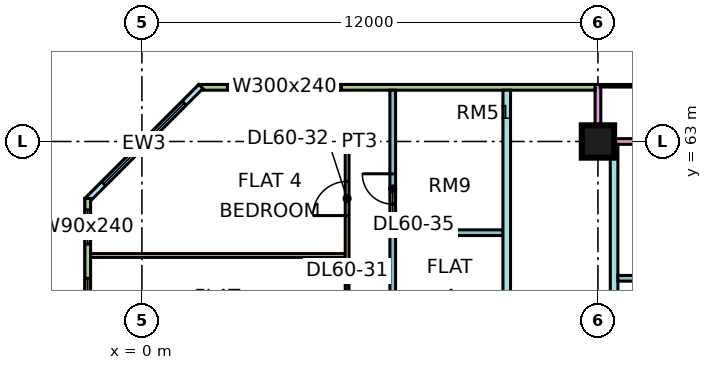
"""IFC4 building model, lengths in metres.
Left out: names, types, materials, properties, quantities, classifications, styles, units other than length and angle.
Written with IfcOpenShell. Run it as: python <this file> out.ifc"""

import sys

from ifc_helpers import new_model, si_unit, direction, frame, frame_2d, origin, origin_2d, place, context, subcontext, project, spatial, rectangle, extrude, element, fill, save


model = new_model("IFC4")
c1 = context("Model", 3, precision=1e-05, world=origin(), true_north=direction((0.0, 1.0)))
c2 = subcontext(c1, "Body", "Model", "MODEL_VIEW")
j1 = project(units=[si_unit("LENGTHUNIT", "METRE"), si_unit("PLANEANGLEUNIT", "RADIAN")], contexts=[c1])
p1 = place(None, origin())
s1 = spatial("IfcSite", under=j1, at=p1, CompositionType="ELEMENT")
p2 = place(p1, origin())
s2 = spatial("IfcBuilding", under=s1, at=p2, CompositionType="ELEMENT")
p3 = place(p2, frame((0.0, 0.0, 252.9)))
s3 = spatial("IfcBuildingStorey", under=s2, at=p3, CompositionType="ELEMENT", Elevation=252.9)
p4 = place(p3, frame((12.0, 63.0, 0.0), z_axis=(0.0, 0.0, 1.0), x_axis=(1.0, 0.0, 0.0)))
e1 = element("IfcColumn", 1, at=p4, inside=s3, PredefinedType="COLUMN", context=c2, shape_type="SweptSolid", body=[
    extrude(rectangle(XDim=0.85, YDim=0.85, at=origin_2d()), origin(), (0.0, 0.0, 1.0), 3.75),
])
p5 = place(p3, frame((22.425, 63.0, 0.0), z_axis=(0.0, 0.0, 1.0), x_axis=(-1.0, 0.0, 0.0)))
e2 = element("IfcWall", 2, at=p5, inside=s3, PredefinedType="SOLIDWALL", context=c2, shape_type="SweptSolid", body=[
    extrude(rectangle(XDim=10.35, YDim=0.15, at=frame_2d((5.175, 0.0))), origin(), (0.0, 0.0, 1.0), 3.3),
])
p6 = place(p5, frame((1.7, 0.0, 0.0)))
e3 = element("IfcOpeningElement", 3, at=p6, cuts=e2, PredefinedType="OPENING", context=c2, shape_type="SweptSolid", body=[
    extrude(rectangle(XDim=1.8, YDim=2.4, at=frame_2d((0.9, 1.2))), frame((0.0, 0.085, 0.0), z_axis=(0.0, -1.0, 0.0), x_axis=(1.0, 0.0, 0.0)), (0.0, 0.0, 1.0), 0.17),
])
p7 = place(p5, frame((6.05, 0.0, 0.45)))
e4 = element("IfcOpeningElement", 4, at=p7, cuts=e2, PredefinedType="OPENING", context=c2, shape_type="SweptSolid", body=[
    extrude(rectangle(XDim=3.0, YDim=2.4, at=frame_2d((1.5, 1.2))), frame((0.0, 0.085, 0.0), z_axis=(0.0, -1.0, 0.0), x_axis=(1.0, 0.0, 0.0)), (0.0, 0.0, 1.0), 0.17),
])
p8 = place(p3, frame((12.0, 64.5, 0.0), z_axis=(0.0, 0.0, 1.0), x_axis=(0.0, -1.0, 0.0)))
e5 = element("IfcWall", 5, at=p8, inside=s3, PredefinedType="SOLIDWALL", context=c2, shape_type="SweptSolid", body=[
    extrude(rectangle(XDim=1.5, YDim=0.15, at=frame_2d((0.75, 0.0))), origin(), (0.0, 0.0, 1.0), 3.3),
])
p9 = place(p3, frame((11.925, 64.425, 0.0), z_axis=(0.0, 0.0, 1.0), x_axis=(-1.0, 0.0, 0.0)))
e6 = element("IfcWall", 6, at=p9, inside=s3, PredefinedType="SOLIDWALL", context=c2, shape_type="SweptSolid", body=[
    extrude(rectangle(XDim=10.425, YDim=0.15, at=frame_2d((5.212, 0.0))), origin(), (0.0, 0.0, 1.0), 3.3),
])
p10 = place(p9, frame((6.675, 0.0, 0.45)))
e7 = element("IfcOpeningElement", 7, at=p10, cuts=e6, PredefinedType="OPENING", context=c2, shape_type="SweptSolid", body=[
    extrude(rectangle(XDim=3.0, YDim=2.4, at=frame_2d((1.5, 1.2))), frame((0.0, 0.085, 0.0), z_axis=(0.0, -1.0, 0.0), x_axis=(1.0, 0.0, 0.0)), (0.0, 0.0, 1.0), 0.17),
])
p11 = place(p3, frame((1.553, 64.447, 0.0), z_axis=(0.0, 0.0, 1.0), x_axis=(-0.707106781187, -0.707106781187, 0.0)))
e8 = element("IfcWall", 8, at=p11, inside=s3, PredefinedType="SOLIDWALL", context=c2, shape_type="SweptSolid", body=[
    extrude(rectangle(XDim=4.243, YDim=0.15, at=frame_2d((2.121, 0.0))), origin(), (0.0, 0.0, 1.0), 3.3),
])
p12 = place(p11, frame((0.621, 0.0, 0.45)))
e9 = element("IfcOpeningElement", 9, at=p12, cuts=e8, PredefinedType="OPENING", context=c2, shape_type="SweptSolid", body=[
    extrude(rectangle(XDim=3.0, YDim=2.4, at=frame_2d((1.5, 1.2))), frame((0.0, 0.085, 0.0), z_axis=(0.0, -1.0, 0.0), x_axis=(1.0, 0.0, 0.0)), (0.0, 0.0, 1.0), 0.17),
])
p13 = place(p3, frame((-1.425, 61.5, 0.0), z_axis=(0.0, 0.0, 1.0), x_axis=(0.0, -1.0, 0.0)))
e10 = element("IfcWall", 10, at=p13, inside=s3, PredefinedType="SOLIDWALL", context=c2, shape_type="SweptSolid", body=[
    extrude(rectangle(XDim=13.425, YDim=0.15, at=frame_2d((6.712, 0.0))), origin(), (0.0, 0.0, 1.0), 3.3),
])
p14 = place(p13, frame((0.3, 0.0, 0.45)))
e11 = element("IfcOpeningElement", 11, at=p14, cuts=e10, PredefinedType="OPENING", context=c2, shape_type="SweptSolid", body=[
    extrude(rectangle(XDim=0.9, YDim=2.4, at=frame_2d((0.45, 1.2))), frame((0.0, 0.085, 0.0), z_axis=(0.0, -1.0, 0.0), x_axis=(1.0, 0.0, 0.0)), (0.0, 0.0, 1.0), 0.17),
])
p15 = place(p13, frame((2.1, 0.0, 0.45)))
e12 = element("IfcOpeningElement", 12, at=p15, cuts=e10, PredefinedType="OPENING", context=c2, shape_type="SweptSolid", body=[
    extrude(rectangle(XDim=1.8, YDim=2.4, at=frame_2d((0.9, 1.2))), frame((0.0, 0.085, 0.0), z_axis=(0.0, -1.0, 0.0), x_axis=(1.0, 0.0, 0.0)), (0.0, 0.0, 1.0), 0.17),
])
p16 = place(p13, frame((7.462, 0.0, 0.45)))
e13 = element("IfcOpeningElement", 13, at=p16, cuts=e10, PredefinedType="OPENING", context=c2, shape_type="SweptSolid", body=[
    extrude(rectangle(XDim=3.0, YDim=2.4, at=frame_2d((1.5, 1.2))), frame((0.0, 0.085, 0.0), z_axis=(0.0, -1.0, 0.0), x_axis=(1.0, 0.0, 0.0)), (0.0, 0.0, 1.0), 0.17),
])
p17 = place(p3, frame((-1.351, 60.0, 0.0), z_axis=(0.0, 0.0, 1.0), x_axis=(1.0, 0.0, 0.0)))
e14 = element("IfcWall", 14, at=p17, inside=s3, PredefinedType="PARTITIONING", context=c2, shape_type="SweptSolid", body=[
    extrude(rectangle(XDim=6.701, YDim=0.1, at=frame_2d((3.351, 0.0))), origin(), (0.0, 0.0, 1.0), 3.3),
])
p18 = place(p3, frame((5.4, 36.1, 0.0), z_axis=(0.0, 0.0, 1.0), x_axis=(0.0, 1.0, 0.0)))
e15 = element("IfcWall", 15, at=p18, inside=s3, PredefinedType="PARTITIONING", context=c2, shape_type="SweptSolid", body=[
    extrude(rectangle(XDim=26.95, YDim=0.1, at=frame_2d((13.475, 0.0))), origin(), (0.0, 0.0, 1.0), 3.3),
])
p19 = place(p18, frame((0.95, 0.0, 0.0)))
e16 = element("IfcOpeningElement", 16, at=p19, cuts=e15, PredefinedType="OPENING", context=c2, shape_type="SweptSolid", body=[
    extrude(rectangle(XDim=0.9, YDim=2.1, at=frame_2d((0.45, 1.05))), frame((0.0, 0.06, 0.0), z_axis=(0.0, -1.0, 0.0), x_axis=(1.0, 0.0, 0.0)), (0.0, 0.0, 1.0), 0.12),
])
p20 = place(p18, frame((3.95, 0.0, 0.0)))
e17 = element("IfcOpeningElement", 17, at=p20, cuts=e15, PredefinedType="OPENING", context=c2, shape_type="SweptSolid", body=[
    extrude(rectangle(XDim=0.9, YDim=2.1, at=frame_2d((0.45, 1.05))), frame((0.0, 0.06, 0.0), z_axis=(0.0, -1.0, 0.0), x_axis=(1.0, 0.0, 0.0)), (0.0, 0.0, 1.0), 0.12),
])
p21 = place(p18, frame((6.95, 0.0, 0.0)))
e18 = element("IfcOpeningElement", 18, at=p21, cuts=e15, PredefinedType="OPENING", context=c2, shape_type="SweptSolid", body=[
    extrude(rectangle(XDim=0.9, YDim=2.1, at=frame_2d((0.45, 1.05))), frame((0.0, 0.06, 0.0), z_axis=(0.0, -1.0, 0.0), x_axis=(1.0, 0.0, 0.0)), (0.0, 0.0, 1.0), 0.12),
])
p22 = place(p18, frame((9.95, 0.0, 0.0)))
e19 = element("IfcOpeningElement", 19, at=p22, cuts=e15, PredefinedType="OPENING", context=c2, shape_type="SweptSolid", body=[
    extrude(rectangle(XDim=0.9, YDim=2.1, at=frame_2d((0.45, 1.05))), frame((0.0, 0.06, 0.0), z_axis=(0.0, -1.0, 0.0), x_axis=(1.0, 0.0, 0.0)), (0.0, 0.0, 1.0), 0.12),
])
p23 = place(p18, frame((21.95, 0.0, 0.0)))
e20 = element("IfcOpeningElement", 20, at=p23, cuts=e15, PredefinedType="OPENING", context=c2, shape_type="SweptSolid", body=[
    extrude(rectangle(XDim=0.9, YDim=2.1, at=frame_2d((0.45, 1.05))), frame((0.0, 0.06, 0.0), z_axis=(0.0, -1.0, 0.0), x_axis=(1.0, 0.0, 0.0)), (0.0, 0.0, 1.0), 0.12),
])
p24 = place(p18, frame((24.95, 0.0, 0.0)))
e21 = element("IfcOpeningElement", 21, at=p24, cuts=e15, PredefinedType="OPENING", context=c2, shape_type="SweptSolid", body=[
    extrude(rectangle(XDim=0.9, YDim=2.1, at=frame_2d((0.45, 1.05))), frame((0.0, 0.06, 0.0), z_axis=(0.0, -1.0, 0.0), x_axis=(1.0, 0.0, 0.0)), (0.0, 0.0, 1.0), 0.12),
])
p25 = place(p18, frame((15.95, 0.0, 0.0)))
e22 = element("IfcOpeningElement", 22, at=p25, cuts=e15, PredefinedType="OPENING", context=c2, shape_type="SweptSolid", body=[
    extrude(rectangle(XDim=0.9, YDim=2.1, at=frame_2d((0.45, 1.05))), frame((0.0, 0.06, 0.0), z_axis=(0.0, -1.0, 0.0), x_axis=(1.0, 0.0, 0.0)), (0.0, 0.0, 1.0), 0.12),
])
p26 = place(p3, frame((5.45, 63.0, 0.0), z_axis=(0.0, 0.0, 1.0), x_axis=(1.0, 0.0, 0.0)))
e23 = element("IfcWall", 23, at=p26, inside=s3, PredefinedType="PARTITIONING", context=c2, shape_type="SweptSolid", body=[
    extrude(rectangle(XDim=0.55, YDim=0.1, at=frame_2d((0.275, 0.0))), origin(), (0.0, 0.0, 1.0), 3.3),
])
p27 = place(p3, frame((6.6, 50.35, 0.0), z_axis=(0.0, 0.0, 1.0), x_axis=(0.0, 1.0, 0.0)))
e24 = element("IfcWall", 24, at=p27, inside=s3, PredefinedType="PARTITIONING", context=c2, shape_type="SweptSolid", body=[
    extrude(rectangle(XDim=14.0, YDim=0.15, at=frame_2d((7.0, 0.0))), origin(), (0.0, 0.0, 1.0), 3.3),
])
p28 = place(p27, frame((11.0, 0.0, 0.0)))
e25 = element("IfcOpeningElement", 25, at=p28, cuts=e24, PredefinedType="OPENING", context=c2, shape_type="SweptSolid", body=[
    extrude(rectangle(XDim=0.8, YDim=2.1, at=frame_2d((0.4, 1.05))), frame((0.0, 0.085, 0.0), z_axis=(0.0, -1.0, 0.0), x_axis=(1.0, 0.0, 0.0)), (0.0, 0.0, 1.0), 0.17),
])
p29 = place(p27, frame((4.25, 0.0, 0.0)))
e26 = element("IfcOpeningElement", 26, at=p29, cuts=e24, PredefinedType="OPENING", context=c2, shape_type="SweptSolid", body=[
    extrude(rectangle(XDim=0.8, YDim=2.1, at=frame_2d((0.4, 1.05))), frame((0.0, 0.085, 0.0), z_axis=(0.0, -1.0, 0.0), x_axis=(1.0, 0.0, 0.0)), (0.0, 0.0, 1.0), 0.17),
])
p30 = place(p27, frame((7.7, 0.0, 0.0)))
e27 = element("IfcOpeningElement", 27, at=p30, cuts=e24, PredefinedType="OPENING", context=c2, shape_type="SweptSolid", body=[
    extrude(rectangle(XDim=0.8, YDim=2.1, at=frame_2d((0.4, 1.05))), frame((0.0, 0.085, 0.0), z_axis=(0.0, -1.0, 0.0), x_axis=(1.0, 0.0, 0.0)), (0.0, 0.0, 1.0), 0.17),
])
p31 = place(p3, frame((6.675, 60.6, 0.0), z_axis=(0.0, 0.0, 1.0), x_axis=(1.0, 0.0, 0.0)))
e28 = element("IfcWall", 28, at=p31, inside=s3, PredefinedType="PARTITIONING", context=c2, shape_type="SweptSolid", body=[
    extrude(rectangle(XDim=2.825, YDim=0.15, at=frame_2d((1.413, 0.0))), origin(), (0.0, 0.0, 1.0), 3.3),
])
p32 = place(p3, frame((9.6, 20.0, 0.0), z_axis=(0.0, 0.0, 1.0), x_axis=(0.0, 1.0, 0.0)))
e29 = element("IfcWall", 29, at=p32, inside=s3, PredefinedType="PARTITIONING", context=c2, shape_type="SweptSolid", body=[
    extrude(rectangle(XDim=44.35, YDim=0.2, at=frame_2d((22.175, 0.0))), origin(), (0.0, 0.0, 1.0), 3.3),
])
p33 = place(p32, frame((28.8, 0.0, 0.0)))
e30 = element("IfcOpeningElement", 30, at=p33, cuts=e29, PredefinedType="OPENING", context=c2, shape_type="SweptSolid", body=[
    extrude(rectangle(XDim=1.0, YDim=2.1, at=frame_2d((0.5, 1.05))), frame((0.0, 0.11, 0.0), z_axis=(0.0, -1.0, 0.0), x_axis=(1.0, 0.0, 0.0)), (0.0, 0.0, 1.0), 0.22),
])
p34 = place(p32, frame((0.6, 0.0, 0.0)))
e31 = element("IfcOpeningElement", 31, at=p34, cuts=e29, PredefinedType="OPENING", context=c2, shape_type="SweptSolid", body=[
    extrude(rectangle(XDim=1.2, YDim=2.1, at=frame_2d((0.6, 1.05))), frame((0.0, 0.11, 0.0), z_axis=(0.0, -1.0, 0.0), x_axis=(1.0, 0.0, 0.0)), (0.0, 0.0, 1.0), 0.22),
])
p35 = place(p32, frame((3.9, 0.0, 0.0)))
e32 = element("IfcOpeningElement", 32, at=p35, cuts=e29, PredefinedType="OPENING", context=c2, shape_type="SweptSolid", body=[
    extrude(rectangle(XDim=1.0, YDim=2.1, at=frame_2d((0.5, 1.05))), frame((0.0, 0.11, 0.0), z_axis=(0.0, -1.0, 0.0), x_axis=(1.0, 0.0, 0.0)), (0.0, 0.0, 1.0), 0.22),
])
p36 = place(p3, frame((12.425, 20.0, 0.0), z_axis=(0.0, 0.0, 1.0), x_axis=(0.0, 1.0, 0.0)))
e33 = element("IfcWall", 33, at=p36, inside=s3, PredefinedType="PARTITIONING", context=c2, shape_type="SweptSolid", body=[
    extrude(rectangle(XDim=42.926, YDim=0.2, at=frame_2d((21.463, 0.0))), origin(), (0.0, 0.0, 1.0), 3.3),
])
p37 = place(p36, frame((7.0, 0.0, 0.0)))
e34 = element("IfcOpeningElement", 34, at=p37, cuts=e33, PredefinedType="OPENING", context=c2, shape_type="SweptSolid", body=[
    extrude(rectangle(XDim=1.0, YDim=2.1, at=frame_2d((0.5, 1.05))), frame((0.0, 0.11, 0.0), z_axis=(0.0, -1.0, 0.0), x_axis=(1.0, 0.0, 0.0)), (0.0, 0.0, 1.0), 0.22),
])
p38 = place(p36, frame((12.95, 0.0, 0.0)))
e35 = element("IfcOpeningElement", 35, at=p38, cuts=e33, PredefinedType="OPENING", context=c2, shape_type="SweptSolid", body=[
    extrude(rectangle(XDim=1.0, YDim=2.1, at=frame_2d((0.5, 1.05))), frame((0.0, 0.11, 0.0), z_axis=(0.0, -1.0, 0.0), x_axis=(1.0, 0.0, 0.0)), (0.0, 0.0, 1.0), 0.22),
])
p39 = place(p36, frame((16.75, 0.0, 0.0)))
e36 = element("IfcOpeningElement", 36, at=p39, cuts=e33, PredefinedType="OPENING", context=c2, shape_type="SweptSolid", body=[
    extrude(rectangle(XDim=1.0, YDim=2.1, at=frame_2d((0.5, 1.05))), frame((0.0, 0.11, 0.0), z_axis=(0.0, -1.0, 0.0), x_axis=(1.0, 0.0, 0.0)), (0.0, 0.0, 1.0), 0.22),
])
p40 = place(p36, frame((34.9, 0.0, 0.0)))
e37 = element("IfcOpeningElement", 37, at=p40, cuts=e33, PredefinedType="OPENING", context=c2, shape_type="SweptSolid", body=[
    extrude(rectangle(XDim=1.0, YDim=2.1, at=frame_2d((0.5, 1.05))), frame((0.0, 0.11, 0.0), z_axis=(0.0, -1.0, 0.0), x_axis=(1.0, 0.0, 0.0)), (0.0, 0.0, 1.0), 0.22),
])
p41 = place(p36, frame((1.15, 0.0, 0.0)))
e38 = element("IfcOpeningElement", 38, at=p41, cuts=e33, PredefinedType="OPENING", context=c2, shape_type="SweptSolid", body=[
    extrude(rectangle(XDim=1.8, YDim=2.1, at=frame_2d((0.9, 1.05))), frame((0.0, 0.11, 0.0), z_axis=(0.0, -1.0, 0.0), x_axis=(1.0, 0.0, 0.0)), (0.0, 0.0, 1.0), 0.22),
])
p42 = place(p36, frame((28.6, 0.0, 0.0)))
e39 = element("IfcOpeningElement", 39, at=p42, cuts=e33, PredefinedType="OPENING", context=c2, shape_type="SweptSolid", body=[
    extrude(rectangle(XDim=1.8, YDim=2.1, at=frame_2d((0.9, 1.05))), frame((0.0, 0.11, 0.0), z_axis=(0.0, -1.0, 0.0), x_axis=(1.0, 0.0, 0.0)), (0.0, 0.0, 1.0), 0.22),
])
p43 = place(p3, frame((12.525, 59.4, 0.0), z_axis=(0.0, 0.0, 1.0), x_axis=(1.0, 0.0, 0.0)))
e40 = element("IfcWall", 40, at=p43, inside=s3, PredefinedType="PARTITIONING", context=c2, shape_type="SweptSolid", body=[
    extrude(rectangle(XDim=4.625, YDim=0.15, at=frame_2d((2.312, 0.0))), origin(), (0.0, 0.0, 1.0), 3.3),
])
p44 = place(p10, origin())
e41 = element("IfcWindow", 41, at=p44, inside=s3, PartitioningType="SINGLE_PANEL", PredefinedType="WINDOW", context=c2, shape_type="SweptSolid", body=[
    extrude(rectangle(XDim=3.0, YDim=2.4, at=frame_2d((1.5, 1.2))), frame((0.0, 0.03, 0.0), z_axis=(0.0, -1.0, 0.0), x_axis=(1.0, 0.0, 0.0)), (0.0, 0.0, 1.0), 0.06),
])
fill(e7, e41)
p45 = place(p12, origin())
e42 = element("IfcWindow", 42, at=p45, inside=s3, PartitioningType="SINGLE_PANEL", PredefinedType="WINDOW", context=c2, shape_type="SweptSolid", body=[
    extrude(rectangle(XDim=3.0, YDim=2.4, at=frame_2d((1.5, 1.2))), frame((0.0, 0.03, 0.0), z_axis=(0.0, -1.0, 0.0), x_axis=(1.0, 0.0, 0.0)), (0.0, 0.0, 1.0), 0.06),
])
fill(e9, e42)
p46 = place(p14, origin())
e43 = element("IfcWindow", 43, at=p46, inside=s3, PartitioningType="SINGLE_PANEL", PredefinedType="WINDOW", context=c2, shape_type="SweptSolid", body=[
    extrude(rectangle(XDim=0.9, YDim=2.4, at=frame_2d((0.45, 1.2))), frame((0.0, 0.03, 0.0), z_axis=(0.0, -1.0, 0.0), x_axis=(1.0, 0.0, 0.0)), (0.0, 0.0, 1.0), 0.06),
])
fill(e11, e43)
p47 = place(p15, origin())
e44 = element("IfcWindow", 44, at=p47, inside=s3, PartitioningType="SINGLE_PANEL", PredefinedType="WINDOW", context=c2, shape_type="SweptSolid", body=[
    extrude(rectangle(XDim=1.8, YDim=2.4, at=frame_2d((0.9, 1.2))), frame((0.0, 0.03, 0.0), z_axis=(0.0, -1.0, 0.0), x_axis=(1.0, 0.0, 0.0)), (0.0, 0.0, 1.0), 0.06),
])
fill(e12, e44)
p48 = place(p24, origin())
e45 = element("IfcDoor", 45, at=p48, inside=s3, OperationType="SINGLE_SWING_LEFT", PredefinedType="DOOR", context=c2, shape_type="SweptSolid", body=[
    extrude(rectangle(XDim=0.9, YDim=2.1, at=frame_2d((0.45, 1.05))), frame((0.0, 0.025, 0.0), z_axis=(0.0, -1.0, 0.0), x_axis=(1.0, 0.0, 0.0)), (0.0, 0.0, 1.0), 0.05),
])
fill(e21, e45)
p49 = place(p28, frame((0.8, 0.0, 0.0), z_axis=(0.0, 0.0, 1.0), x_axis=(-1.0, 0.0, 0.0)))
e46 = element("IfcDoor", 46, at=p49, inside=s3, OperationType="SINGLE_SWING_RIGHT", PredefinedType="DOOR", context=c2, shape_type="SweptSolid", body=[
    extrude(rectangle(XDim=0.8, YDim=2.1, at=frame_2d((0.4, 1.05))), frame((0.0, 0.025, 0.0), z_axis=(0.0, -1.0, 0.0), x_axis=(1.0, 0.0, 0.0)), (0.0, 0.0, 1.0), 0.05),
])
fill(e25, e46)
save(model, sys.argv[1])
